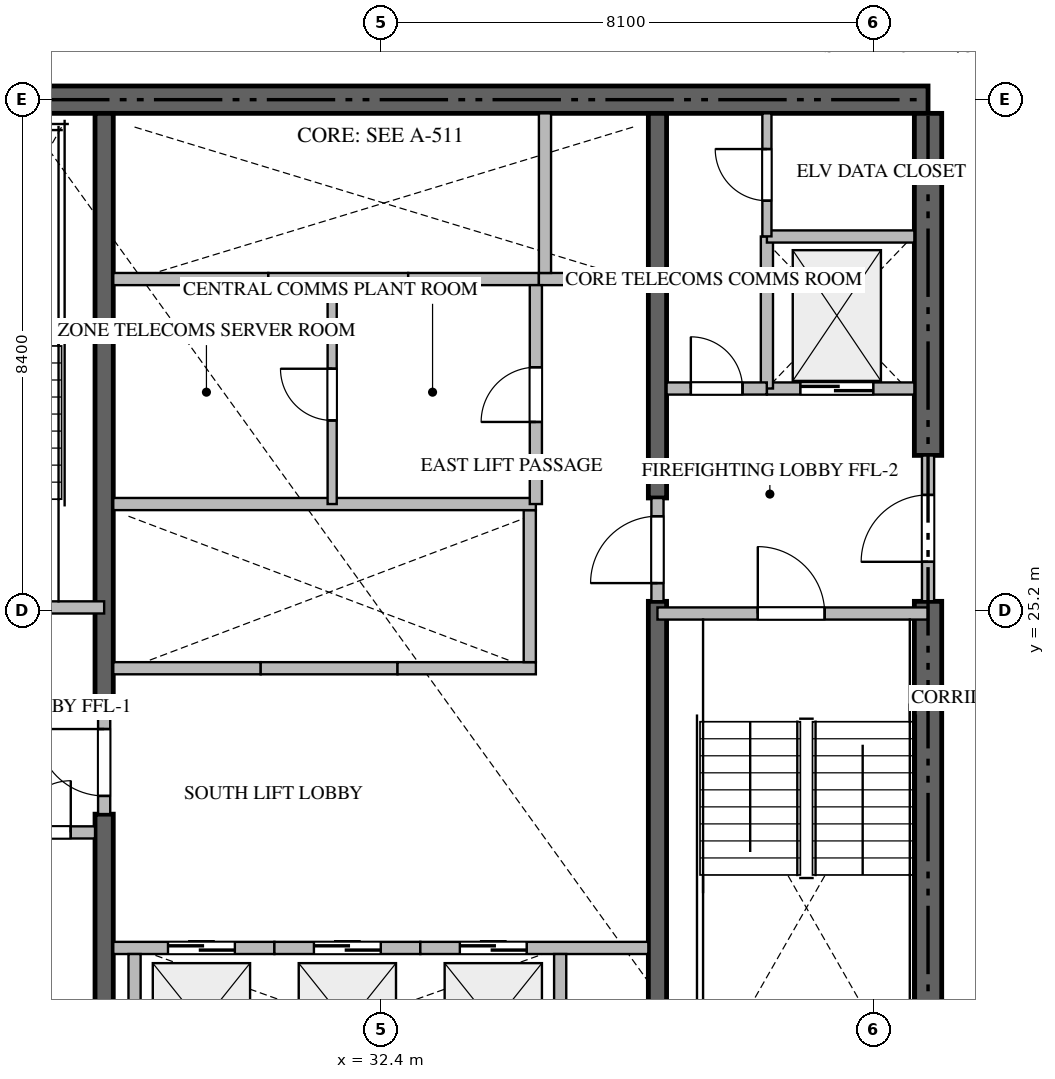
"""IFC4 building model, lengths in metres.
Left out: names, types, materials, properties, quantities, classifications, styles, units other than length and angle.
Written with IfcOpenShell. Run it as: python <this file> out.ifc"""

import sys

from ifc_helpers import new_model, si_unit, direction, frame, frame_2d, origin, place, context, subcontext, project, spatial, rectangle, extrude, source, transform, mapped, element, fill, save


model = new_model("IFC4")
c1 = context("Model", 3, precision=1e-05, world=origin(), true_north=direction((0.0, 1.0)))
c2 = subcontext(c1, "Body", "Model", "MODEL_VIEW")
j1 = project(units=[si_unit("LENGTHUNIT", "METRE"), si_unit("PLANEANGLEUNIT", "RADIAN")], contexts=[c1])
p1 = place(None, origin())
s1 = spatial("IfcSite", under=j1, at=p1, CompositionType="ELEMENT")
p2 = place(p1, origin())
s2 = spatial("IfcBuilding", under=s1, at=p2, CompositionType="ELEMENT")
p3 = place(p2, frame((0.0, 0.0, 52.95)))
s3 = spatial("IfcBuildingStorey", under=s2, at=p3, CompositionType="ELEMENT", Elevation=52.95)
p4 = place(p3, frame((41.4, 33.6, -0.26), z_axis=(0.0, 0.0, 1.0), x_axis=(-1.0, 0.0, 0.0)))
e1 = element("IfcWall", 1, at=p4, inside=s3, PredefinedType="SHEAR", context=c2, shape_type="SweptSolid", body=[
    extrude(rectangle(XDim=18.0, YDim=0.45, at=frame_2d((9.0, 0.0))), origin(), (0.0, 0.0, 1.0), 3.748),
])
p5 = place(p3, frame((41.4, 17.025, -0.26), z_axis=(0.0, 0.0, 1.0), x_axis=(0.0, 1.0, 0.0)))
e2 = element("IfcWall", 2, at=p5, inside=s3, PredefinedType="SHEAR", context=c2, shape_type="SweptSolid", body=[
    extrude(rectangle(XDim=8.325, YDim=0.45, at=frame_2d((4.163, 0.0))), origin(), (0.0, 0.0, 1.0), 3.748),
])
p6 = place(p3, frame((41.4, 27.75, -0.26), z_axis=(0.0, 0.0, 1.0), x_axis=(0.0, 1.0, 0.0)))
e3 = element("IfcWall", 3, at=p6, inside=s3, PredefinedType="SHEAR", context=c2, shape_type="SweptSolid", body=[
    extrude(rectangle(XDim=5.625, YDim=0.45, at=frame_2d((2.812, 0.0))), origin(), (0.0, 0.0, 1.0), 3.748),
])
p7 = place(p3, frame((27.85, 17.025, -0.26), z_axis=(0.0, 0.0, 1.0), x_axis=(0.0, 1.0, 0.0)))
e4 = element("IfcWall", 4, at=p7, inside=s3, PredefinedType="SHEAR", context=c2, shape_type="SweptSolid", body=[
    extrude(rectangle(XDim=4.825, YDim=0.3, at=frame_2d((2.413, 0.0))), origin(), (0.0, 0.0, 1.0), 3.748),
])
p8 = place(p3, frame((27.85, 23.55, -0.26), z_axis=(0.0, 0.0, 1.0), x_axis=(0.0, 1.0, 0.0)))
e5 = element("IfcWall", 5, at=p8, inside=s3, PredefinedType="SHEAR", context=c2, shape_type="SweptSolid", body=[
    extrude(rectangle(XDim=9.825, YDim=0.3, at=frame_2d((4.913, 0.0))), origin(), (0.0, 0.0, 1.0), 3.748),
])
p9 = place(p3, frame((36.95, 17.025, -0.26), z_axis=(0.0, 0.0, 1.0), x_axis=(0.0, 1.0, 0.0)))
e6 = element("IfcWall", 6, at=p9, inside=s3, PredefinedType="SHEAR", context=c2, shape_type="SweptSolid", body=[
    extrude(rectangle(XDim=8.325, YDim=0.3, at=frame_2d((4.163, 0.0))), origin(), (0.0, 0.0, 1.0), 3.748),
])
p10 = place(p3, frame((36.95, 27.05, -0.26), z_axis=(0.0, 0.0, 1.0), x_axis=(0.0, 1.0, 0.0)))
e7 = element("IfcWall", 7, at=p10, inside=s3, PredefinedType="SHEAR", context=c2, shape_type="SweptSolid", body=[
    extrude(rectangle(XDim=6.325, YDim=0.3, at=frame_2d((3.163, 0.0))), origin(), (0.0, 0.0, 1.0), 3.748),
])
p11 = place(p3, frame((23.4, 25.25, 0.0), z_axis=(0.0, 0.0, 1.0), x_axis=(1.0, 0.0, 0.0)))
e8 = element("IfcWall", 8, at=p11, inside=s3, PredefinedType="STANDARD", context=c2, shape_type="SweptSolid", body=[
    extrude(rectangle(XDim=4.45, YDim=0.2, at=frame_2d((2.225, 0.0))), origin(), (0.0, 0.0, 1.0), 3.49),
])
p12 = place(p11, frame((1.65, 0.0, 0.0)))
e9 = element("IfcOpeningElement", 9, at=p12, cuts=e8, PredefinedType="OPENING", context=c2, shape_type="SweptSolid", body=[
    extrude(rectangle(XDim=1.1, YDim=2.15, at=frame_2d((0.55, 1.075))), frame((0.0, 0.11, 0.0), z_axis=(0.0, -1.0, 0.0), x_axis=(1.0, 0.0, 0.0)), (0.0, 0.0, 1.0), 0.22),
])
p13 = place(p3, frame((36.95, 25.15, 0.0), z_axis=(0.0, 0.0, 1.0), x_axis=(1.0, 0.0, 0.0)))
e10 = element("IfcWall", 10, at=p13, inside=s3, PredefinedType="STANDARD", context=c2, shape_type="SweptSolid", body=[
    extrude(rectangle(XDim=4.45, YDim=0.2, at=frame_2d((2.225, 0.0))), origin(), (0.0, 0.0, 1.0), 3.49),
])
p14 = place(p13, frame((1.65, 0.0, 0.0)))
e11 = element("IfcOpeningElement", 11, at=p14, cuts=e10, PredefinedType="OPENING", context=c2, shape_type="SweptSolid", body=[
    extrude(rectangle(XDim=1.1, YDim=2.15, at=frame_2d((0.55, 1.075))), frame((0.0, 0.11, 0.0), z_axis=(0.0, -1.0, 0.0), x_axis=(1.0, 0.0, 0.0)), (0.0, 0.0, 1.0), 0.22),
])
p15 = place(p3, frame((38.75, 28.85, 0.0), z_axis=(0.0, 0.0, 1.0), x_axis=(1.0, 0.0, 0.0)))
e12 = element("IfcWall", 12, at=p15, inside=s3, PredefinedType="STANDARD", context=c2, shape_type="SweptSolid", body=[
    extrude(rectangle(XDim=2.425, YDim=0.2, at=frame_2d((1.212, 0.0))), origin(), (0.0, 0.0, 1.0), 3.49),
])
p16 = place(p15, frame((0.55, 0.0, 0.0)))
e13 = element("IfcOpeningElement", 13, at=p16, cuts=e12, PredefinedType="OPENING", context=c2, shape_type="SweptSolid", body=[
    extrude(rectangle(XDim=1.2, YDim=2.2, at=frame_2d((0.6, 1.1))), frame((0.0, 0.11, 0.0), z_axis=(0.0, -1.0, 0.0), x_axis=(1.0, 0.0, 0.0)), (0.0, 0.0, 1.0), 0.22),
])
p17 = place(p3, frame((28.0, 19.65, 0.0), z_axis=(0.0, 0.0, 1.0), x_axis=(1.0, 0.0, 0.0)))
e14 = element("IfcWall", 14, at=p17, inside=s3, PredefinedType="STANDARD", context=c2, shape_type="SweptSolid", body=[
    extrude(rectangle(XDim=2.65, YDim=0.2, at=frame_2d((1.325, 0.0))), origin(), (0.0, 0.0, 1.0), 3.49),
])
p18 = place(p17, frame((0.9, 0.0, 0.0)))
e15 = element("IfcOpeningElement", 15, at=p18, cuts=e14, PredefinedType="OPENING", context=c2, shape_type="SweptSolid", body=[
    extrude(rectangle(XDim=1.1, YDim=2.2, at=frame_2d((0.55, 1.1))), frame((0.0, 0.11, 0.0), z_axis=(0.0, -1.0, 0.0), x_axis=(1.0, 0.0, 0.0)), (0.0, 0.0, 1.0), 0.22),
])
p19 = place(p3, frame((28.35, 17.025, 0.0), z_axis=(0.0, 0.0, 1.0), x_axis=(0.0, 1.0, 0.0)))
e16 = element("IfcWall", 16, at=p19, inside=s3, PredefinedType="STANDARD", context=c2, shape_type="SweptSolid", body=[
    extrude(rectangle(XDim=2.525, YDim=0.2, at=frame_2d((1.263, 0.0))), origin(), (0.0, 0.0, 1.0), 3.49),
])
p20 = place(p3, frame((30.65, 19.65, 0.0), z_axis=(0.0, 0.0, 1.0), x_axis=(1.0, 0.0, 0.0)))
e17 = element("IfcWall", 17, at=p20, inside=s3, PredefinedType="STANDARD", context=c2, shape_type="SweptSolid", body=[
    extrude(rectangle(XDim=2.4, YDim=0.2, at=frame_2d((1.2, 0.0))), origin(), (0.0, 0.0, 1.0), 3.49),
])
p21 = place(p20, frame((0.65, 0.0, 0.0)))
e18 = element("IfcOpeningElement", 18, at=p21, cuts=e17, PredefinedType="OPENING", context=c2, shape_type="SweptSolid", body=[
    extrude(rectangle(XDim=1.1, YDim=2.2, at=frame_2d((0.55, 1.1))), frame((0.0, 0.11, 0.0), z_axis=(0.0, -1.0, 0.0), x_axis=(1.0, 0.0, 0.0)), (0.0, 0.0, 1.0), 0.22),
])
p22 = place(p3, frame((33.05, 19.65, 0.0), z_axis=(0.0, 0.0, 1.0), x_axis=(1.0, 0.0, 0.0)))
e19 = element("IfcWall", 19, at=p22, inside=s3, PredefinedType="STANDARD", context=c2, shape_type="SweptSolid", body=[
    extrude(rectangle(XDim=3.75, YDim=0.2, at=frame_2d((1.875, 0.0))), origin(), (0.0, 0.0, 1.0), 3.49),
])
p23 = place(p22, frame((0.65, 0.0, 0.0)))
e20 = element("IfcOpeningElement", 20, at=p23, cuts=e19, PredefinedType="OPENING", context=c2, shape_type="SweptSolid", body=[
    extrude(rectangle(XDim=1.1, YDim=2.2, at=frame_2d((0.55, 1.1))), frame((0.0, 0.11, 0.0), z_axis=(0.0, -1.0, 0.0), x_axis=(1.0, 0.0, 0.0)), (0.0, 0.0, 1.0), 0.22),
])
p24 = place(p3, frame((35.35, 17.025, 0.0), z_axis=(0.0, 0.0, 1.0), x_axis=(0.0, 1.0, 0.0)))
e21 = element("IfcWall", 21, at=p24, inside=s3, PredefinedType="STANDARD", context=c2, shape_type="SweptSolid", body=[
    extrude(rectangle(XDim=2.525, YDim=0.2, at=frame_2d((1.263, 0.0))), origin(), (0.0, 0.0, 1.0), 3.49),
])
p25 = place(p3, frame((28.0, 24.25, 0.0), z_axis=(0.0, 0.0, 1.0), x_axis=(1.0, 0.0, 0.0)))
e22 = element("IfcWall", 22, at=p25, inside=s3, PredefinedType="STANDARD", context=c2, shape_type="SweptSolid", body=[
    extrude(rectangle(XDim=2.425, YDim=0.2, at=frame_2d((1.212, 0.0))), origin(), (0.0, 0.0, 1.0), 3.49),
])
p26 = place(p3, frame((30.425, 24.25, 0.0), z_axis=(0.0, 0.0, 1.0), x_axis=(1.0, 0.0, 0.0)))
e23 = element("IfcWall", 23, at=p26, inside=s3, PredefinedType="STANDARD", context=c2, shape_type="SweptSolid", body=[
    extrude(rectangle(XDim=2.25, YDim=0.2, at=frame_2d((1.125, 0.0))), origin(), (0.0, 0.0, 1.0), 3.49),
])
p27 = place(p3, frame((32.675, 24.25, 0.0), z_axis=(0.0, 0.0, 1.0), x_axis=(1.0, 0.0, 0.0)))
e24 = element("IfcWall", 24, at=p27, inside=s3, PredefinedType="STANDARD", context=c2, shape_type="SweptSolid", body=[
    extrude(rectangle(XDim=2.275, YDim=0.2, at=frame_2d((1.137, 0.0))), origin(), (0.0, 0.0, 1.0), 3.49),
])
p28 = place(p3, frame((34.85, 24.35, 0.0), z_axis=(0.0, 0.0, 1.0), x_axis=(0.0, 1.0, 0.0)))
e25 = element("IfcWall", 25, at=p28, inside=s3, PredefinedType="STANDARD", context=c2, shape_type="SweptSolid", body=[
    extrude(rectangle(XDim=2.5, YDim=0.2, at=frame_2d((1.25, 0.0))), origin(), (0.0, 0.0, 1.0), 3.49),
])
p29 = place(p3, frame((28.0, 30.65, 0.0), z_axis=(0.0, 0.0, 1.0), x_axis=(1.0, 0.0, 0.0)))
e26 = element("IfcWall", 26, at=p29, inside=s3, PredefinedType="STANDARD", context=c2, shape_type="SweptSolid", body=[
    extrude(rectangle(XDim=2.55, YDim=0.2, at=frame_2d((1.275, 0.0))), origin(), (0.0, 0.0, 1.0), 3.49),
])
p30 = place(p3, frame((30.55, 30.65, 0.0), z_axis=(0.0, 0.0, 1.0), x_axis=(1.0, 0.0, 0.0)))
e27 = element("IfcWall", 27, at=p30, inside=s3, PredefinedType="STANDARD", context=c2, shape_type="SweptSolid", body=[
    extrude(rectangle(XDim=2.3, YDim=0.2, at=frame_2d((1.15, 0.0))), origin(), (0.0, 0.0, 1.0), 3.49),
])
p31 = place(p3, frame((32.85, 30.65, 0.0), z_axis=(0.0, 0.0, 1.0), x_axis=(1.0, 0.0, 0.0)))
e28 = element("IfcWall", 28, at=p31, inside=s3, PredefinedType="STANDARD", context=c2, shape_type="SweptSolid", body=[
    extrude(rectangle(XDim=2.15, YDim=0.2, at=frame_2d((1.075, 0.0))), origin(), (0.0, 0.0, 1.0), 3.49),
])
p32 = place(p3, frame((35.0, 30.65, 0.0), z_axis=(0.0, 0.0, 1.0), x_axis=(1.0, 0.0, 0.0)))
e29 = element("IfcWall", 29, at=p32, inside=s3, PredefinedType="STANDARD", context=c2, shape_type="SweptSolid", body=[
    extrude(rectangle(XDim=1.8, YDim=0.2, at=frame_2d((0.9, 0.0))), origin(), (0.0, 0.0, 1.0), 3.49),
])
p33 = place(p3, frame((35.1, 30.75, 0.0), z_axis=(0.0, 0.0, 1.0), x_axis=(0.0, 1.0, 0.0)))
e30 = element("IfcWall", 30, at=p33, inside=s3, PredefinedType="STANDARD", context=c2, shape_type="SweptSolid", body=[
    extrude(rectangle(XDim=2.625, YDim=0.2, at=frame_2d((1.312, 0.0))), origin(), (0.0, 0.0, 1.0), 3.49),
])
p34 = place(p3, frame((26.052, 21.55, 0.0), z_axis=(0.0, 0.0, 1.0), x_axis=(1.0, 0.0, 0.0)))
e31 = element("IfcWall", 31, at=p34, inside=s3, PredefinedType="STANDARD", context=c2, shape_type="SweptSolid", body=[
    extrude(rectangle(XDim=1.648, YDim=0.2, at=frame_2d((0.824, 0.0))), origin(), (0.0, 0.0, 1.0), 3.49),
])
p35 = place(p34, frame((0.399, 0.0, 0.0)))
e32 = element("IfcOpeningElement", 32, at=p35, cuts=e31, PredefinedType="OPENING", context=c2, shape_type="SweptSolid", body=[
    extrude(rectangle(XDim=0.85, YDim=2.1, at=frame_2d((0.425, 1.05))), frame((0.0, 0.11, 0.0), z_axis=(0.0, -1.0, 0.0), x_axis=(1.0, 0.0, 0.0)), (0.0, 0.0, 1.0), 0.22),
])
p36 = place(p3, frame((38.75, 28.85, 0.0), z_axis=(0.0, 0.0, 1.0), x_axis=(0.0, 1.0, 0.0)))
e33 = element("IfcWall", 33, at=p36, inside=s3, PredefinedType="STANDARD", context=c2, shape_type="SweptSolid", body=[
    extrude(rectangle(XDim=2.5, YDim=0.2, at=frame_2d((1.25, 0.0))), origin(), (0.0, 0.0, 1.0), 3.49),
])
p37 = place(p3, frame((38.75, 31.35, 0.0), z_axis=(0.0, 0.0, 1.0), x_axis=(1.0, 0.0, 0.0)))
e34 = element("IfcWall", 34, at=p37, inside=s3, PredefinedType="STANDARD", context=c2, shape_type="SweptSolid", body=[
    extrude(rectangle(XDim=2.425, YDim=0.2, at=frame_2d((1.212, 0.0))), origin(), (0.0, 0.0, 1.0), 3.49),
])
p38 = place(p3, frame((37.1, 28.85, 0.0), z_axis=(0.0, 0.0, 1.0), x_axis=(1.0, 0.0, 0.0)))
e35 = element("IfcWall", 35, at=p38, inside=s3, PredefinedType="STANDARD", context=c2, shape_type="SweptSolid", body=[
    extrude(rectangle(XDim=1.648, YDim=0.2, at=frame_2d((0.824, 0.0))), origin(), (0.0, 0.0, 1.0), 3.49),
])
p39 = place(p38, frame((0.399, 0.0, 0.0)))
e36 = element("IfcOpeningElement", 36, at=p39, cuts=e35, PredefinedType="OPENING", context=c2, shape_type="SweptSolid", body=[
    extrude(rectangle(XDim=0.85, YDim=2.1, at=frame_2d((0.425, 1.05))), frame((0.0, 0.11, 0.0), z_axis=(0.0, -1.0, 0.0), x_axis=(1.0, 0.0, 0.0)), (0.0, 0.0, 1.0), 0.22),
])
p40 = place(p3, frame((41.4, 25.352, 0.0), z_axis=(0.0, 0.0, 1.0), x_axis=(0.0, 1.0, 0.0)))
e37 = element("IfcWall", 37, at=p40, inside=s3, PredefinedType="STANDARD", context=c2, shape_type="SweptSolid", body=[
    extrude(rectangle(XDim=2.396, YDim=0.2, at=frame_2d((1.198, 0.0))), origin(), (0.0, 0.0, 1.0), 3.49),
])
p41 = place(p40, frame((0.648, 0.0, 0.0)))
e38 = element("IfcOpeningElement", 38, at=p41, cuts=e37, PredefinedType="OPENING", context=c2, shape_type="SweptSolid", body=[
    extrude(rectangle(XDim=1.1, YDim=2.15, at=frame_2d((0.55, 1.075))), frame((0.0, 0.11, 0.0), z_axis=(0.0, -1.0, 0.0), x_axis=(1.0, 0.0, 0.0)), (0.0, 0.0, 1.0), 0.22),
])
p42 = place(p3, frame((27.85, 21.852, 0.0), z_axis=(0.0, 0.0, 1.0), x_axis=(0.0, 1.0, 0.0)))
e39 = element("IfcWall", 39, at=p42, inside=s3, PredefinedType="STANDARD", context=c2, shape_type="SweptSolid", body=[
    extrude(rectangle(XDim=1.696, YDim=0.2, at=frame_2d((0.848, 0.0))), origin(), (0.0, 0.0, 1.0), 3.49),
])
p43 = place(p42, frame((0.298, 0.0, 0.0)))
e40 = element("IfcOpeningElement", 40, at=p43, cuts=e39, PredefinedType="OPENING", context=c2, shape_type="SweptSolid", body=[
    extrude(rectangle(XDim=1.1, YDim=2.15, at=frame_2d((0.55, 1.075))), frame((0.0, 0.11, 0.0), z_axis=(0.0, -1.0, 0.0), x_axis=(1.0, 0.0, 0.0)), (0.0, 0.0, 1.0), 0.22),
])
p44 = place(p3, frame((36.95, 25.352, 0.0), z_axis=(0.0, 0.0, 1.0), x_axis=(0.0, 1.0, 0.0)))
e41 = element("IfcWall", 41, at=p44, inside=s3, PredefinedType="STANDARD", context=c2, shape_type="SweptSolid", body=[
    extrude(rectangle(XDim=1.696, YDim=0.2, at=frame_2d((0.848, 0.0))), origin(), (0.0, 0.0, 1.0), 3.49),
])
p45 = place(p44, frame((0.298, 0.0, 0.0)))
e42 = element("IfcOpeningElement", 42, at=p45, cuts=e41, PredefinedType="OPENING", context=c2, shape_type="SweptSolid", body=[
    extrude(rectangle(XDim=1.1, YDim=2.15, at=frame_2d((0.55, 1.075))), frame((0.0, 0.11, 0.0), z_axis=(0.0, -1.0, 0.0), x_axis=(1.0, 0.0, 0.0)), (0.0, 0.0, 1.0), 0.22),
])
p46 = place(p3, frame((28.0, 26.95, 0.0), z_axis=(0.0, 0.0, 1.0), x_axis=(1.0, 0.0, 0.0)))
e43 = element("IfcWall", 43, at=p46, inside=s3, PredefinedType="STANDARD", context=c2, shape_type="SweptSolid", body=[
    extrude(rectangle(XDim=6.95, YDim=0.2, at=frame_2d((3.475, 0.0))), origin(), (0.0, 0.0, 1.0), 3.49),
])
p47 = place(p3, frame((38.75, 31.352, 0.0), z_axis=(0.0, 0.0, 1.0), x_axis=(0.0, 1.0, 0.0)))
e44 = element("IfcWall", 44, at=p47, inside=s3, PredefinedType="PARTITIONING", context=c2, shape_type="SweptSolid", body=[
    extrude(rectangle(XDim=2.023, YDim=0.15, at=frame_2d((1.011, 0.0))), origin(), (0.0, 0.0, 1.0), 3.49),
])
p48 = place(p47, frame((0.586, 0.0, 0.0)))
e45 = element("IfcOpeningElement", 45, at=p48, cuts=e44, PredefinedType="OPENING", context=c2, shape_type="SweptSolid", body=[
    extrude(rectangle(XDim=0.85, YDim=2.1, at=frame_2d((0.425, 1.05))), frame((0.0, 0.085, 0.0), z_axis=(0.0, -1.0, 0.0), x_axis=(1.0, 0.0, 0.0)), (0.0, 0.0, 1.0), 0.17),
])
p49 = place(p3, frame((34.95, 26.95, 0.0), z_axis=(0.0, 0.0, 1.0), x_axis=(0.0, 1.0, 0.0)))
e46 = element("IfcWall", 46, at=p49, inside=s3, PredefinedType="STANDARD", context=c2, shape_type="SweptSolid", body=[
    extrude(rectangle(XDim=3.6, YDim=0.2, at=frame_2d((1.8, 0.0))), origin(), (0.0, 0.0, 1.0), 3.49),
])
p50 = place(p49, frame((1.35, 0.0, 0.0)))
e47 = element("IfcOpeningElement", 47, at=p50, cuts=e46, PredefinedType="OPENING", context=c2, shape_type="SweptSolid", body=[
    extrude(rectangle(XDim=0.9, YDim=2.1, at=frame_2d((0.45, 1.05))), frame((0.0, 0.11, 0.0), z_axis=(0.0, -1.0, 0.0), x_axis=(1.0, 0.0, 0.0)), (0.0, 0.0, 1.0), 0.22),
])
p51 = place(p3, frame((31.6, 26.95, 0.0), z_axis=(0.0, 0.0, 1.0), x_axis=(0.0, 1.0, 0.0)))
e48 = element("IfcWall", 48, at=p51, inside=s3, PredefinedType="PARTITIONING", context=c2, shape_type="SweptSolid", body=[
    extrude(rectangle(XDim=3.6, YDim=0.15, at=frame_2d((1.8, 0.0))), origin(), (0.0, 0.0, 1.0), 3.49),
])
p52 = place(p51, frame((1.375, 0.0, 0.0)))
e49 = element("IfcOpeningElement", 49, at=p52, cuts=e48, PredefinedType="OPENING", context=c2, shape_type="SweptSolid", body=[
    extrude(rectangle(XDim=0.85, YDim=2.1, at=frame_2d((0.425, 1.05))), frame((0.0, 0.085, 0.0), z_axis=(0.0, -1.0, 0.0), x_axis=(1.0, 0.0, 0.0)), (0.0, 0.0, 1.0), 0.17),
])
m1 = source(origin(), c2, "Body", "SweptSolid", [
    extrude(rectangle(XDim=1.1, YDim=2.15, at=frame_2d((0.55, 1.075))), frame((0.0, 0.025, 0.0), z_axis=(0.0, -1.0, 0.0), x_axis=(1.0, 0.0, 0.0)), (0.0, 0.0, 1.0), 0.05),
])
p53 = place(p14, origin())
e50 = element("IfcDoor", 50, at=p53, inside=s3, OperationType="SINGLE_SWING_LEFT", PredefinedType="DOOR", context=c2, shape_type="MappedRepresentation", body=[
    mapped(m1, transform((0.0, 0.0, 0.0), scale=1.0)),
])
fill(e11, e50)
m2 = source(origin(), c2, "Body", "SweptSolid", [
    extrude(rectangle(XDim=1.2, YDim=2.2, at=frame_2d((0.6, 1.1))), frame((0.0, 0.025, 0.0), z_axis=(0.0, -1.0, 0.0), x_axis=(1.0, 0.0, 0.0)), (0.0, 0.0, 1.0), 0.05),
])
p54 = place(p16, origin())
e51 = element("IfcDoor", 51, at=p54, inside=s3, OperationType="DOUBLE_DOOR_SLIDING", PredefinedType="DOOR", context=c2, shape_type="MappedRepresentation", body=[
    mapped(m2, transform((0.0, 0.0, 0.0), scale=1.0)),
])
fill(e13, e51)
m3 = source(origin(), c2, "Body", "SweptSolid", [
    extrude(rectangle(XDim=1.1, YDim=2.2, at=frame_2d((0.55, 1.1))), frame((0.0, 0.025, 0.0), z_axis=(0.0, -1.0, 0.0), x_axis=(1.0, 0.0, 0.0)), (0.0, 0.0, 1.0), 0.05),
])
p55 = place(p18, origin())
e52 = element("IfcDoor", 52, at=p55, inside=s3, OperationType="DOUBLE_DOOR_SLIDING", PredefinedType="DOOR", context=c2, shape_type="MappedRepresentation", body=[
    mapped(m3, transform((0.0, 0.0, 0.0), scale=1.0)),
])
fill(e15, e52)
p56 = place(p21, origin())
e53 = element("IfcDoor", 53, at=p56, inside=s3, OperationType="DOUBLE_DOOR_SLIDING", PredefinedType="DOOR", context=c2, shape_type="MappedRepresentation", body=[
    mapped(m3, transform((0.0, 0.0, 0.0), scale=1.0)),
])
fill(e18, e53)
p57 = place(p23, origin())
e54 = element("IfcDoor", 54, at=p57, inside=s3, OperationType="DOUBLE_DOOR_SLIDING", PredefinedType="DOOR", context=c2, shape_type="MappedRepresentation", body=[
    mapped(m3, transform((0.0, 0.0, 0.0), scale=1.0)),
])
fill(e20, e54)
m4 = source(origin(), c2, "Body", "SweptSolid", [
    extrude(rectangle(XDim=0.85, YDim=2.1, at=frame_2d((0.425, 1.05))), frame((0.0, 0.025, 0.0), z_axis=(0.0, -1.0, 0.0), x_axis=(1.0, 0.0, 0.0)), (0.0, 0.0, 1.0), 0.05),
])
p58 = place(p35, origin())
e55 = element("IfcDoor", 55, at=p58, inside=s3, OperationType="SINGLE_SWING_RIGHT", PredefinedType="DOOR", context=c2, shape_type="MappedRepresentation", body=[
    mapped(m4, transform((0.0, 0.0, 0.0), scale=1.0)),
])
fill(e32, e55)
p59 = place(p39, origin())
e56 = element("IfcDoor", 56, at=p59, inside=s3, OperationType="SINGLE_SWING_LEFT", PredefinedType="DOOR", context=c2, shape_type="MappedRepresentation", body=[
    mapped(m4, transform((0.0, 0.0, 0.0), scale=1.0)),
])
fill(e36, e56)
p60 = place(p41, origin())
e57 = element("IfcDoor", 57, at=p60, inside=s3, OperationType="SINGLE_SWING_LEFT", PredefinedType="DOOR", context=c2, shape_type="MappedRepresentation", body=[
    mapped(m1, transform((0.0, 0.0, 0.0), scale=1.0)),
])
fill(e38, e57)
p61 = place(p43, origin())
e58 = element("IfcDoor", 58, at=p61, inside=s3, OperationType="SINGLE_SWING_RIGHT", PredefinedType="DOOR", context=c2, shape_type="MappedRepresentation", body=[
    mapped(m1, transform((0.0, 0.0, 0.0), scale=1.0)),
])
fill(e40, e58)
p62 = place(p45, origin())
e59 = element("IfcDoor", 59, at=p62, inside=s3, OperationType="SINGLE_SWING_LEFT", PredefinedType="DOOR", context=c2, shape_type="MappedRepresentation", body=[
    mapped(m1, transform((0.0, 0.0, 0.0), scale=1.0)),
])
fill(e42, e59)
p63 = place(p48, origin())
e60 = element("IfcDoor", 60, at=p63, inside=s3, OperationType="SINGLE_SWING_RIGHT", PredefinedType="DOOR", context=c2, shape_type="MappedRepresentation", body=[
    mapped(m4, transform((0.0, 0.0, 0.0), scale=1.0)),
])
fill(e45, e60)
m5 = source(origin(), c2, "Body", "SweptSolid", [
    extrude(rectangle(XDim=0.9, YDim=2.1, at=frame_2d((0.45, 1.05))), frame((0.0, 0.025, 0.0), z_axis=(0.0, -1.0, 0.0), x_axis=(1.0, 0.0, 0.0)), (0.0, 0.0, 1.0), 0.05),
])
p64 = place(p50, origin())
e61 = element("IfcDoor", 61, at=p64, inside=s3, OperationType="SINGLE_SWING_LEFT", PredefinedType="DOOR", context=c2, shape_type="MappedRepresentation", body=[
    mapped(m5, transform((0.0, 0.0, 0.0), scale=1.0)),
])
fill(e47, e61)
p65 = place(p52, origin())
e62 = element("IfcDoor", 62, at=p65, inside=s3, OperationType="SINGLE_SWING_RIGHT", PredefinedType="DOOR", context=c2, shape_type="MappedRepresentation", body=[
    mapped(m4, transform((0.0, 0.0, 0.0), scale=1.0)),
])
fill(e49, e62)
save(model, sys.argv[1])
